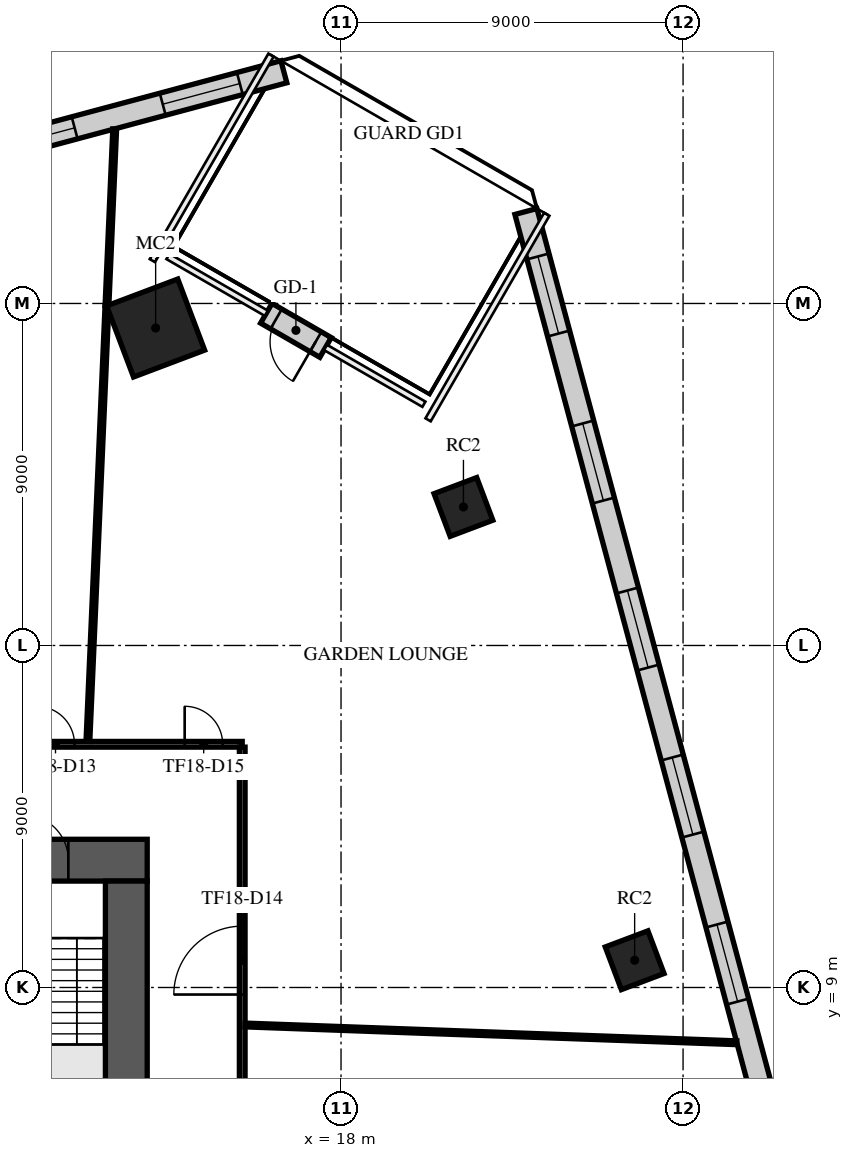
"""IFC4 building model, lengths in metres.
Left out: names, types, materials, properties, quantities, classifications, styles, units other than length and angle.
Written with IfcOpenShell. Run it as: python <this file> out.ifc"""

import sys

from ifc_helpers import new_model, si_unit, direction, frame, frame_2d, origin, origin_2d, place, context, subcontext, project, spatial, rectangle, extrude, element, fill, save


model = new_model("IFC4")
c1 = context("Model", 3, precision=1e-05, world=origin(), true_north=direction((0.0, 1.0)))
c2 = subcontext(c1, "Body", "Model", "MODEL_VIEW")
j1 = project(units=[si_unit("LENGTHUNIT", "METRE"), si_unit("PLANEANGLEUNIT", "RADIAN")], contexts=[c1])
p1 = place(None, origin())
s1 = spatial("IfcSite", under=j1, at=p1, CompositionType="ELEMENT")
p2 = place(p1, origin())
s2 = spatial("IfcBuilding", under=s1, at=p2, CompositionType="ELEMENT")
p3 = place(p2, frame((0.0, 0.0, 86.1)))
s3 = spatial("IfcBuildingStorey", under=s2, at=p3, CompositionType="ELEMENT", Elevation=86.1)
p4 = place(p3, frame((13.122, 26.354, 0.0), z_axis=(0.0, 0.0, 1.0), x_axis=(0.935491525991, 0.353349125935, 0.0)))
e1 = element("IfcColumn", 1, at=p4, inside=s3, PredefinedType="COLUMN", context=c2, shape_type="SweptSolid", body=[
    extrude(rectangle(XDim=2.0, YDim=2.0, at=origin_2d()), origin(), (0.0, 0.0, 1.0), 4.0),
])
for number, where, z_axis, x_axis in (
    (2, (25.726, 9.717, 0.0), (0.0, 0.0, 1.0), (0.935, 0.353, 0.0)),
    (3, (21.221, 21.645, 0.0), (0.0, 0.0, 1.0), (0.935, 0.353, 0.0)),
):
    element("IfcColumn", number, at=place(p3, frame(where, z_axis=z_axis, x_axis=x_axis)), inside=s3, PredefinedType="COLUMN", context=c2, shape_type="SweptSolid", body=[
        extrude(rectangle(XDim=1.2, YDim=1.2, at=origin_2d()), origin(), (0.0, 0.0, 1.0), 4.0),
    ])
p5 = place(p3, frame((-12.9, 12.35, 0.0), z_axis=(0.0, 0.0, 1.0), x_axis=(1.0, 0.0, 0.0)))
e4 = element("IfcWall", 4, at=p5, inside=s3, PredefinedType="SHEAR", context=c2, shape_type="SweptSolid", body=[
    extrude(rectangle(XDim=25.8, YDim=1.1, at=frame_2d((12.9, 0.0))), origin(), (0.0, 0.0, 1.0), 3.58),
])
p6 = place(p5, frame((11.7, 0.0, 0.0)))
e5 = element("IfcOpeningElement", 5, at=p6, cuts=e4, PredefinedType="OPENING", context=c2, shape_type="SweptSolid", body=[
    extrude(rectangle(XDim=2.4, YDim=2.4, at=frame_2d((1.2, 1.2))), frame((0.0, 0.56, 0.0), z_axis=(0.0, -1.0, 0.0), x_axis=(1.0, 0.0, 0.0)), (0.0, 0.0, 1.0), 1.12),
])
p7 = place(p5, frame((22.525, 0.0, 0.0)))
e6 = element("IfcOpeningElement", 6, at=p7, cuts=e4, PredefinedType="OPENING", context=c2, shape_type="SweptSolid", body=[
    extrude(rectangle(XDim=1.2, YDim=2.1, at=frame_2d((0.6, 1.05))), frame((0.0, 0.56, 0.0), z_axis=(0.0, -1.0, 0.0), x_axis=(1.0, 0.0, 0.0)), (0.0, 0.0, 1.0), 1.12),
])
p8 = place(p5, frame((1.5, 0.0, 0.0)))
e7 = element("IfcOpeningElement", 7, at=p8, cuts=e4, PredefinedType="OPENING", context=c2, shape_type="SweptSolid", body=[
    extrude(rectangle(XDim=1.0, YDim=2.1, at=frame_2d((0.5, 1.05))), frame((0.0, 0.56, 0.0), z_axis=(0.0, -1.0, 0.0), x_axis=(1.0, 0.0, 0.0)), (0.0, 0.0, 1.0), 1.12),
])
p9 = place(p3, frame((12.35, -11.8, 0.0), z_axis=(0.0, 0.0, 1.0), x_axis=(0.0, 1.0, 0.0)))
e8 = element("IfcWall", 8, at=p9, inside=s3, PredefinedType="SHEAR", context=c2, shape_type="SweptSolid", body=[
    extrude(rectangle(XDim=23.6, YDim=1.1, at=frame_2d((11.8, 0.0))), origin(), (0.0, 0.0, 1.0), 3.58),
])
p10 = place(p9, frame((10.6, 0.0, 0.0)))
e9 = element("IfcOpeningElement", 9, at=p10, cuts=e8, PredefinedType="OPENING", context=c2, shape_type="SweptSolid", body=[
    extrude(rectangle(XDim=2.4, YDim=2.4, at=frame_2d((1.2, 1.2))), frame((0.0, 0.56, 0.0), z_axis=(0.0, -1.0, 0.0), x_axis=(1.0, 0.0, 0.0)), (0.0, 0.0, 1.0), 1.12),
])
p11 = place(p3, frame((16.496, 33.097, 0.0), z_axis=(0.0, 0.0, 1.0), x_axis=(-0.965926333894, -0.258817150689, 0.0)))
e10 = element("IfcWall", 10, at=p11, inside=s3, PredefinedType="STANDARD", context=c2, shape_type="SweptSolid", body=[
    extrude(rectangle(XDim=49.376, YDim=0.6, at=frame_2d((24.688, 0.0))), origin(), (0.0, 0.0, 1.0), 3.58),
])
p12 = place(p11, frame((1.2, 0.0, 0.9)))
e11 = element("IfcOpeningElement", 11, at=p12, cuts=e10, PredefinedType="OPENING", context=c2, shape_type="SweptSolid", body=[
    extrude(rectangle(XDim=2.1, YDim=2.1, at=frame_2d((1.05, 1.05))), frame((0.0, 0.31, 0.0), z_axis=(0.0, -1.0, 0.0), x_axis=(1.0, 0.0, 0.0)), (0.0, 0.0, 1.0), 0.62),
])
p13 = place(p11, frame((5.7, 0.0, 0.9)))
e12 = element("IfcOpeningElement", 12, at=p13, cuts=e10, PredefinedType="OPENING", context=c2, shape_type="SweptSolid", body=[
    extrude(rectangle(XDim=2.1, YDim=2.1, at=frame_2d((1.05, 1.05))), frame((0.0, 0.31, 0.0), z_axis=(0.0, -1.0, 0.0), x_axis=(1.0, 0.0, 0.0)), (0.0, 0.0, 1.0), 0.62),
])
p14 = place(p11, frame((10.2, 0.0, 0.9)))
e13 = element("IfcOpeningElement", 13, at=p14, cuts=e10, PredefinedType="OPENING", context=c2, shape_type="SweptSolid", body=[
    extrude(rectangle(XDim=2.1, YDim=2.1, at=frame_2d((1.05, 1.05))), frame((0.0, 0.31, 0.0), z_axis=(0.0, -1.0, 0.0), x_axis=(1.0, 0.0, 0.0)), (0.0, 0.0, 1.0), 0.62),
])
p15 = place(p11, frame((14.7, 0.0, 0.9)))
e14 = element("IfcOpeningElement", 14, at=p15, cuts=e10, PredefinedType="OPENING", context=c2, shape_type="SweptSolid", body=[
    extrude(rectangle(XDim=2.1, YDim=2.1, at=frame_2d((1.05, 1.05))), frame((0.0, 0.31, 0.0), z_axis=(0.0, -1.0, 0.0), x_axis=(1.0, 0.0, 0.0)), (0.0, 0.0, 1.0), 0.62),
])
p16 = place(p11, frame((19.2, 0.0, 0.9)))
e15 = element("IfcOpeningElement", 15, at=p16, cuts=e10, PredefinedType="OPENING", context=c2, shape_type="SweptSolid", body=[
    extrude(rectangle(XDim=2.1, YDim=2.1, at=frame_2d((1.05, 1.05))), frame((0.0, 0.31, 0.0), z_axis=(0.0, -1.0, 0.0), x_axis=(1.0, 0.0, 0.0)), (0.0, 0.0, 1.0), 0.62),
])
p17 = place(p11, frame((23.7, 0.0, 0.9)))
e16 = element("IfcOpeningElement", 16, at=p17, cuts=e10, PredefinedType="OPENING", context=c2, shape_type="SweptSolid", body=[
    extrude(rectangle(XDim=2.1, YDim=2.1, at=frame_2d((1.05, 1.05))), frame((0.0, 0.31, 0.0), z_axis=(0.0, -1.0, 0.0), x_axis=(1.0, 0.0, 0.0)), (0.0, 0.0, 1.0), 0.62),
])
p18 = place(p11, frame((28.2, 0.0, 0.9)))
e17 = element("IfcOpeningElement", 17, at=p18, cuts=e10, PredefinedType="OPENING", context=c2, shape_type="SweptSolid", body=[
    extrude(rectangle(XDim=2.1, YDim=2.1, at=frame_2d((1.05, 1.05))), frame((0.0, 0.31, 0.0), z_axis=(0.0, -1.0, 0.0), x_axis=(1.0, 0.0, 0.0)), (0.0, 0.0, 1.0), 0.62),
])
p19 = place(p11, frame((32.7, 0.0, 0.9)))
e18 = element("IfcOpeningElement", 18, at=p19, cuts=e10, PredefinedType="OPENING", context=c2, shape_type="SweptSolid", body=[
    extrude(rectangle(XDim=2.1, YDim=2.1, at=frame_2d((1.05, 1.05))), frame((0.0, 0.31, 0.0), z_axis=(0.0, -1.0, 0.0), x_axis=(1.0, 0.0, 0.0)), (0.0, 0.0, 1.0), 0.62),
])
p20 = place(p11, frame((37.2, 0.0, 0.9)))
e19 = element("IfcOpeningElement", 19, at=p20, cuts=e10, PredefinedType="OPENING", context=c2, shape_type="SweptSolid", body=[
    extrude(rectangle(XDim=2.1, YDim=2.1, at=frame_2d((1.05, 1.05))), frame((0.0, 0.31, 0.0), z_axis=(0.0, -1.0, 0.0), x_axis=(1.0, 0.0, 0.0)), (0.0, 0.0, 1.0), 0.62),
])
p21 = place(p11, frame((41.7, 0.0, 0.9)))
e20 = element("IfcOpeningElement", 20, at=p21, cuts=e10, PredefinedType="OPENING", context=c2, shape_type="SweptSolid", body=[
    extrude(rectangle(XDim=2.1, YDim=2.1, at=frame_2d((1.05, 1.05))), frame((0.0, 0.31, 0.0), z_axis=(0.0, -1.0, 0.0), x_axis=(1.0, 0.0, 0.0)), (0.0, 0.0, 1.0), 0.62),
])
p22 = place(p11, frame((46.138, 0.0, 0.9)))
e21 = element("IfcOpeningElement", 21, at=p22, cuts=e10, PredefinedType="OPENING", context=c2, shape_type="SweptSolid", body=[
    extrude(rectangle(XDim=2.1, YDim=2.1, at=frame_2d((1.05, 1.05))), frame((0.0, 0.31, 0.0), z_axis=(0.0, -1.0, 0.0), x_axis=(1.0, 0.0, 0.0)), (0.0, 0.0, 1.0), 0.62),
])
p23 = place(p3, frame((34.609, -14.409, 0.0), z_axis=(0.0, 0.0, 1.0), x_axis=(-0.258819814566, 0.965925620112, 0.0)))
e22 = element("IfcWall", 22, at=p23, inside=s3, PredefinedType="STANDARD", context=c2, shape_type="SweptSolid", body=[
    extrude(rectangle(XDim=45.376, YDim=0.6, at=frame_2d((22.688, 0.0))), origin(), (0.0, 0.0, 1.0), 3.58),
])
p24 = place(p23, frame((1.163, 0.0, 0.9)))
e23 = element("IfcOpeningElement", 23, at=p24, cuts=e22, PredefinedType="OPENING", context=c2, shape_type="SweptSolid", body=[
    extrude(rectangle(XDim=2.1, YDim=2.1, at=frame_2d((1.05, 1.05))), frame((0.0, 0.31, 0.0), z_axis=(0.0, -1.0, 0.0), x_axis=(1.0, 0.0, 0.0)), (0.0, 0.0, 1.0), 0.62),
])
p25 = place(p23, frame((5.651, 0.0, 0.9)))
e24 = element("IfcOpeningElement", 24, at=p25, cuts=e22, PredefinedType="OPENING", context=c2, shape_type="SweptSolid", body=[
    extrude(rectangle(XDim=2.1, YDim=2.1, at=frame_2d((1.05, 1.05))), frame((0.0, 0.31, 0.0), z_axis=(0.0, -1.0, 0.0), x_axis=(1.0, 0.0, 0.0)), (0.0, 0.0, 1.0), 0.62),
])
p26 = place(p23, frame((10.201, 0.0, 0.9)))
e25 = element("IfcOpeningElement", 25, at=p26, cuts=e22, PredefinedType="OPENING", context=c2, shape_type="SweptSolid", body=[
    extrude(rectangle(XDim=2.1, YDim=2.1, at=frame_2d((1.05, 1.05))), frame((0.0, 0.31, 0.0), z_axis=(0.0, -1.0, 0.0), x_axis=(1.0, 0.0, 0.0)), (0.0, 0.0, 1.0), 0.62),
])
p27 = place(p23, frame((14.751, 0.0, 0.9)))
e26 = element("IfcOpeningElement", 26, at=p27, cuts=e22, PredefinedType="OPENING", context=c2, shape_type="SweptSolid", body=[
    extrude(rectangle(XDim=2.1, YDim=2.1, at=frame_2d((1.05, 1.05))), frame((0.0, 0.31, 0.0), z_axis=(0.0, -1.0, 0.0), x_axis=(1.0, 0.0, 0.0)), (0.0, 0.0, 1.0), 0.62),
])
p28 = place(p23, frame((19.301, 0.0, 0.9)))
e27 = element("IfcOpeningElement", 27, at=p28, cuts=e22, PredefinedType="OPENING", context=c2, shape_type="SweptSolid", body=[
    extrude(rectangle(XDim=2.1, YDim=2.1, at=frame_2d((1.05, 1.05))), frame((0.0, 0.31, 0.0), z_axis=(0.0, -1.0, 0.0), x_axis=(1.0, 0.0, 0.0)), (0.0, 0.0, 1.0), 0.62),
])
p29 = place(p23, frame((23.851, 0.0, 0.9)))
e28 = element("IfcOpeningElement", 28, at=p29, cuts=e22, PredefinedType="OPENING", context=c2, shape_type="SweptSolid", body=[
    extrude(rectangle(XDim=2.1, YDim=2.1, at=frame_2d((1.05, 1.05))), frame((0.0, 0.31, 0.0), z_axis=(0.0, -1.0, 0.0), x_axis=(1.0, 0.0, 0.0)), (0.0, 0.0, 1.0), 0.62),
])
p30 = place(p23, frame((28.401, 0.0, 0.9)))
e29 = element("IfcOpeningElement", 29, at=p30, cuts=e22, PredefinedType="OPENING", context=c2, shape_type="SweptSolid", body=[
    extrude(rectangle(XDim=2.1, YDim=2.1, at=frame_2d((1.05, 1.05))), frame((0.0, 0.31, 0.0), z_axis=(0.0, -1.0, 0.0), x_axis=(1.0, 0.0, 0.0)), (0.0, 0.0, 1.0), 0.62),
])
p31 = place(p23, frame((32.951, 0.0, 0.9)))
e30 = element("IfcOpeningElement", 30, at=p31, cuts=e22, PredefinedType="OPENING", context=c2, shape_type="SweptSolid", body=[
    extrude(rectangle(XDim=2.1, YDim=2.1, at=frame_2d((1.05, 1.05))), frame((0.0, 0.31, 0.0), z_axis=(0.0, -1.0, 0.0), x_axis=(1.0, 0.0, 0.0)), (0.0, 0.0, 1.0), 0.62),
])
p32 = place(p23, frame((37.501, 0.0, 0.9)))
e31 = element("IfcOpeningElement", 31, at=p32, cuts=e22, PredefinedType="OPENING", context=c2, shape_type="SweptSolid", body=[
    extrude(rectangle(XDim=2.1, YDim=2.1, at=frame_2d((1.05, 1.05))), frame((0.0, 0.31, 0.0), z_axis=(0.0, -1.0, 0.0), x_axis=(1.0, 0.0, 0.0)), (0.0, 0.0, 1.0), 0.62),
])
p33 = place(p23, frame((42.051, 0.0, 0.9)))
e32 = element("IfcOpeningElement", 32, at=p33, cuts=e22, PredefinedType="OPENING", context=c2, shape_type="SweptSolid", body=[
    extrude(rectangle(XDim=2.1, YDim=2.1, at=frame_2d((1.05, 1.05))), frame((0.0, 0.31, 0.0), z_axis=(0.0, -1.0, 0.0), x_axis=(1.0, 0.0, 0.0)), (0.0, 0.0, 1.0), 0.62),
])
p34 = place(p3, frame((17.593, 25.843, 0.0), z_axis=(0.0, 0.0, 1.0), x_axis=(-0.866047807691, 0.499961193289, 0.0)))
e33 = element("IfcWall", 33, at=p34, inside=s3, PredefinedType="STANDARD", context=c2, shape_type="SweptSolid", body=[
    extrude(rectangle(XDim=1.8, YDim=0.6, at=frame_2d((0.9, 0.0))), origin(), (0.0, 0.0, 1.0), 3.58),
])
p35 = place(p34, frame((0.3, 0.0, 0.0)))
e34 = element("IfcOpeningElement", 34, at=p35, cuts=e33, PredefinedType="OPENING", context=c2, shape_type="SweptSolid", body=[
    extrude(rectangle(XDim=1.2, YDim=2.4, at=frame_2d((0.6, 1.2))), frame((0.0, 0.31, 0.0), z_axis=(0.0, -1.0, 0.0), x_axis=(1.0, 0.0, 0.0)), (0.0, 0.0, 1.0), 0.62),
])
p36 = place(p3, frame((-15.325, 15.4, 0.0), z_axis=(0.0, 0.0, 1.0), x_axis=(1.0, 0.0, 0.0)))
e35 = element("IfcWall", 35, at=p36, inside=s3, PredefinedType="PARTITIONING", context=c2, shape_type="SweptSolid", body=[
    extrude(rectangle(XDim=30.725, YDim=0.15, at=frame_2d((15.362, 0.0))), origin(), (0.0, 0.0, 1.0), 3.08),
])
p37 = place(p36, frame((2.05, 0.0, 0.0)))
e36 = element("IfcOpeningElement", 36, at=p37, cuts=e35, PredefinedType="OPENING", context=c2, shape_type="SweptSolid", body=[
    extrude(rectangle(XDim=1.8, YDim=2.1, at=frame_2d((0.9, 1.05))), frame((0.0, 0.085, 0.0), z_axis=(0.0, -1.0, 0.0), x_axis=(1.0, 0.0, 0.0)), (0.0, 0.0, 1.0), 0.17),
])
p38 = place(p36, frame((13.188, 0.0, 0.0)))
e37 = element("IfcOpeningElement", 37, at=p38, cuts=e35, PredefinedType="OPENING", context=c2, shape_type="SweptSolid", body=[
    extrude(rectangle(XDim=1.0, YDim=2.1, at=frame_2d((0.5, 1.05))), frame((0.0, 0.085, 0.0), z_axis=(0.0, -1.0, 0.0), x_axis=(1.0, 0.0, 0.0)), (0.0, 0.0, 1.0), 0.17),
])
p39 = place(p36, frame((15.892, 0.0, 0.0)))
e38 = element("IfcOpeningElement", 38, at=p39, cuts=e35, PredefinedType="OPENING", context=c2, shape_type="SweptSolid", body=[
    extrude(rectangle(XDim=1.0, YDim=2.1, at=frame_2d((0.5, 1.05))), frame((0.0, 0.085, 0.0), z_axis=(0.0, -1.0, 0.0), x_axis=(1.0, 0.0, 0.0)), (0.0, 0.0, 1.0), 0.17),
])
p40 = place(p36, frame((25.312, 0.0, 0.0)))
e39 = element("IfcOpeningElement", 39, at=p40, cuts=e35, PredefinedType="OPENING", context=c2, shape_type="SweptSolid", body=[
    extrude(rectangle(XDim=1.0, YDim=2.1, at=frame_2d((0.5, 1.05))), frame((0.0, 0.085, 0.0), z_axis=(0.0, -1.0, 0.0), x_axis=(1.0, 0.0, 0.0)), (0.0, 0.0, 1.0), 0.17),
])
p41 = place(p36, frame((29.211, 0.0, 0.0)))
e40 = element("IfcOpeningElement", 40, at=p41, cuts=e35, PredefinedType="OPENING", context=c2, shape_type="SweptSolid", body=[
    extrude(rectangle(XDim=1.0, YDim=2.1, at=frame_2d((0.5, 1.05))), frame((0.0, 0.085, 0.0), z_axis=(0.0, -1.0, 0.0), x_axis=(1.0, 0.0, 0.0)), (0.0, 0.0, 1.0), 0.17),
])
p42 = place(p3, frame((15.4, -15.325, 0.0), z_axis=(0.0, 0.0, 1.0), x_axis=(0.0, 1.0, 0.0)))
e41 = element("IfcWall", 41, at=p42, inside=s3, PredefinedType="PARTITIONING", context=c2, shape_type="SweptSolid", body=[
    extrude(rectangle(XDim=30.65, YDim=0.15, at=frame_2d((15.325, 0.0))), origin(), (0.0, 0.0, 1.0), 3.08),
])
p43 = place(p42, frame((24.14, 0.0, 0.0)))
e42 = element("IfcOpeningElement", 42, at=p43, cuts=e41, PredefinedType="OPENING", context=c2, shape_type="SweptSolid", body=[
    extrude(rectangle(XDim=1.8, YDim=2.1, at=frame_2d((0.9, 1.05))), frame((0.0, 0.085, 0.0), z_axis=(0.0, -1.0, 0.0), x_axis=(1.0, 0.0, 0.0)), (0.0, 0.0, 1.0), 0.17),
])
p44 = place(p42, frame((3.3, 0.0, 0.0)))
e43 = element("IfcOpeningElement", 43, at=p44, cuts=e41, PredefinedType="OPENING", context=c2, shape_type="SweptSolid", body=[
    extrude(rectangle(XDim=1.8, YDim=2.1, at=frame_2d((0.9, 1.05))), frame((0.0, 0.085, 0.0), z_axis=(0.0, -1.0, 0.0), x_axis=(1.0, 0.0, 0.0)), (0.0, 0.0, 1.0), 0.17),
])
p45 = place(p42, frame((19.191, 0.0, 0.0)))
e44 = element("IfcOpeningElement", 44, at=p45, cuts=e41, PredefinedType="OPENING", context=c2, shape_type="SweptSolid", body=[
    extrude(rectangle(XDim=1.0, YDim=2.1, at=frame_2d((0.5, 1.05))), frame((0.0, 0.085, 0.0), z_axis=(0.0, -1.0, 0.0), x_axis=(1.0, 0.0, 0.0)), (0.0, 0.0, 1.0), 0.17),
])
p46 = place(p42, frame((10.963, 0.0, 0.0)))
e45 = element("IfcOpeningElement", 45, at=p46, cuts=e41, PredefinedType="OPENING", context=c2, shape_type="SweptSolid", body=[
    extrude(rectangle(XDim=1.0, YDim=2.1, at=frame_2d((0.5, 1.05))), frame((0.0, 0.085, 0.0), z_axis=(0.0, -1.0, 0.0), x_axis=(1.0, 0.0, 0.0)), (0.0, 0.0, 1.0), 0.17),
])
p47 = place(p3, frame((11.339, 15.477, 0.0), z_axis=(0.0, 0.0, 1.0), x_axis=(0.04370366829, 0.999044538235, 0.0)))
e46 = element("IfcWall", 46, at=p47, inside=s3, PredefinedType="PARTITIONING", context=c2, shape_type="SweptSolid", body=[
    extrude(rectangle(XDim=11.452, YDim=0.1, at=frame_2d((5.726, 0.0))), origin(), (0.0, 0.0, 1.0), 3.58),
])
p48 = place(p3, frame((11.841, 26.939, 0.0), z_axis=(0.0, 0.0, 1.0), x_axis=(0.04372159787, 0.999043753736, 0.0)))
e47 = element("IfcWall", 47, at=p48, inside=s3, PredefinedType="PARTITIONING", context=c2, shape_type="SweptSolid", body=[
    extrude(rectangle(XDim=4.657, YDim=0.1, at=frame_2d((2.329, 0.0))), origin(), (0.0, 0.0, 1.0), 3.58),
])
p49 = place(p3, frame((15.477, 8.013, 0.0), z_axis=(0.0, 0.0, 1.0), x_axis=(0.999348235862, -0.036098524609, 0.0)))
e48 = element("IfcWall", 48, at=p49, inside=s3, PredefinedType="PARTITIONING", context=c2, shape_type="SweptSolid", body=[
    extrude(rectangle(XDim=12.945, YDim=0.1, at=frame_2d((6.472, 0.0))), origin(), (0.0, 0.0, 1.0), 3.58),
])
p50 = place(p7, origin())
e49 = element("IfcDoor", 49, at=p50, inside=s3, OperationType="SINGLE_SWING_LEFT", PredefinedType="DOOR", context=c2, shape_type="SweptSolid", body=[
    extrude(rectangle(XDim=1.2, YDim=2.1, at=frame_2d((0.6, 1.05))), frame((0.0, 0.025, 0.0), z_axis=(0.0, -1.0, 0.0), x_axis=(1.0, 0.0, 0.0)), (0.0, 0.0, 1.0), 0.05),
])
fill(e6, e49)
p51 = place(p12, origin())
e50 = element("IfcWindow", 50, at=p51, inside=s3, PartitioningType="SINGLE_PANEL", PredefinedType="WINDOW", context=c2, shape_type="SweptSolid", body=[
    extrude(rectangle(XDim=2.1, YDim=2.1, at=frame_2d((1.05, 1.05))), frame((0.0, 0.03, 0.0), z_axis=(0.0, -1.0, 0.0), x_axis=(1.0, 0.0, 0.0)), (0.0, 0.0, 1.0), 0.06),
])
fill(e11, e50)
p52 = place(p13, origin())
e51 = element("IfcWindow", 51, at=p52, inside=s3, PartitioningType="SINGLE_PANEL", PredefinedType="WINDOW", context=c2, shape_type="SweptSolid", body=[
    extrude(rectangle(XDim=2.1, YDim=2.1, at=frame_2d((1.05, 1.05))), frame((0.0, 0.03, 0.0), z_axis=(0.0, -1.0, 0.0), x_axis=(1.0, 0.0, 0.0)), (0.0, 0.0, 1.0), 0.06),
])
fill(e12, e51)
p53 = place(p29, origin())
e52 = element("IfcWindow", 52, at=p53, inside=s3, PartitioningType="SINGLE_PANEL", PredefinedType="WINDOW", context=c2, shape_type="SweptSolid", body=[
    extrude(rectangle(XDim=2.1, YDim=2.1, at=frame_2d((1.05, 1.05))), frame((0.0, 0.03, 0.0), z_axis=(0.0, -1.0, 0.0), x_axis=(1.0, 0.0, 0.0)), (0.0, 0.0, 1.0), 0.06),
])
fill(e28, e52)
p54 = place(p30, origin())
e53 = element("IfcWindow", 53, at=p54, inside=s3, PartitioningType="SINGLE_PANEL", PredefinedType="WINDOW", context=c2, shape_type="SweptSolid", body=[
    extrude(rectangle(XDim=2.1, YDim=2.1, at=frame_2d((1.05, 1.05))), frame((0.0, 0.03, 0.0), z_axis=(0.0, -1.0, 0.0), x_axis=(1.0, 0.0, 0.0)), (0.0, 0.0, 1.0), 0.06),
])
fill(e29, e53)
p55 = place(p31, origin())
e54 = element("IfcWindow", 54, at=p55, inside=s3, PartitioningType="SINGLE_PANEL", PredefinedType="WINDOW", context=c2, shape_type="SweptSolid", body=[
    extrude(rectangle(XDim=2.1, YDim=2.1, at=frame_2d((1.05, 1.05))), frame((0.0, 0.03, 0.0), z_axis=(0.0, -1.0, 0.0), x_axis=(1.0, 0.0, 0.0)), (0.0, 0.0, 1.0), 0.06),
])
fill(e30, e54)
p56 = place(p32, origin())
e55 = element("IfcWindow", 55, at=p56, inside=s3, PartitioningType="SINGLE_PANEL", PredefinedType="WINDOW", context=c2, shape_type="SweptSolid", body=[
    extrude(rectangle(XDim=2.1, YDim=2.1, at=frame_2d((1.05, 1.05))), frame((0.0, 0.03, 0.0), z_axis=(0.0, -1.0, 0.0), x_axis=(1.0, 0.0, 0.0)), (0.0, 0.0, 1.0), 0.06),
])
fill(e31, e55)
p57 = place(p33, origin())
e56 = element("IfcWindow", 56, at=p57, inside=s3, PartitioningType="SINGLE_PANEL", PredefinedType="WINDOW", context=c2, shape_type="SweptSolid", body=[
    extrude(rectangle(XDim=2.1, YDim=2.1, at=frame_2d((1.05, 1.05))), frame((0.0, 0.03, 0.0), z_axis=(0.0, -1.0, 0.0), x_axis=(1.0, 0.0, 0.0)), (0.0, 0.0, 1.0), 0.06),
])
fill(e32, e56)
p58 = place(p35, origin())
e57 = element("IfcDoor", 57, at=p58, inside=s3, OperationType="SINGLE_SWING_LEFT", PredefinedType="DOOR", context=c2, shape_type="SweptSolid", body=[
    extrude(rectangle(XDim=1.2, YDim=2.4, at=frame_2d((0.6, 1.2))), frame((0.0, 0.025, 0.0), z_axis=(0.0, -1.0, 0.0), x_axis=(1.0, 0.0, 0.0)), (0.0, 0.0, 1.0), 0.05),
])
fill(e34, e57)
p59 = place(p40, origin())
e58 = element("IfcDoor", 58, at=p59, inside=s3, OperationType="SINGLE_SWING_RIGHT", PredefinedType="DOOR", context=c2, shape_type="SweptSolid", body=[
    extrude(rectangle(XDim=1.0, YDim=2.1, at=frame_2d((0.5, 1.05))), frame((0.0, 0.025, 0.0), z_axis=(0.0, -1.0, 0.0), x_axis=(1.0, 0.0, 0.0)), (0.0, 0.0, 1.0), 0.05),
])
fill(e39, e58)
p60 = place(p43, frame((1.8, 0.0, 0.0), z_axis=(0.0, 0.0, 1.0), x_axis=(-1.0, 0.0, 0.0)))
e59 = element("IfcDoor", 59, at=p60, inside=s3, OperationType="DOUBLE_DOOR_SINGLE_SWING", PredefinedType="DOOR", context=c2, shape_type="SweptSolid", body=[
    extrude(rectangle(XDim=1.8, YDim=2.1, at=frame_2d((0.9, 1.05))), frame((0.0, 0.025, 0.0), z_axis=(0.0, -1.0, 0.0), x_axis=(1.0, 0.0, 0.0)), (0.0, 0.0, 1.0), 0.05),
])
fill(e42, e59)
p61 = place(p41, origin())
e60 = element("IfcDoor", 60, at=p61, inside=s3, OperationType="SINGLE_SWING_LEFT", PredefinedType="DOOR", context=c2, shape_type="SweptSolid", body=[
    extrude(rectangle(XDim=1.0, YDim=2.1, at=frame_2d((0.5, 1.05))), frame((0.0, 0.025, 0.0), z_axis=(0.0, -1.0, 0.0), x_axis=(1.0, 0.0, 0.0)), (0.0, 0.0, 1.0), 0.05),
])
fill(e40, e60)
save(model, sys.argv[1])
